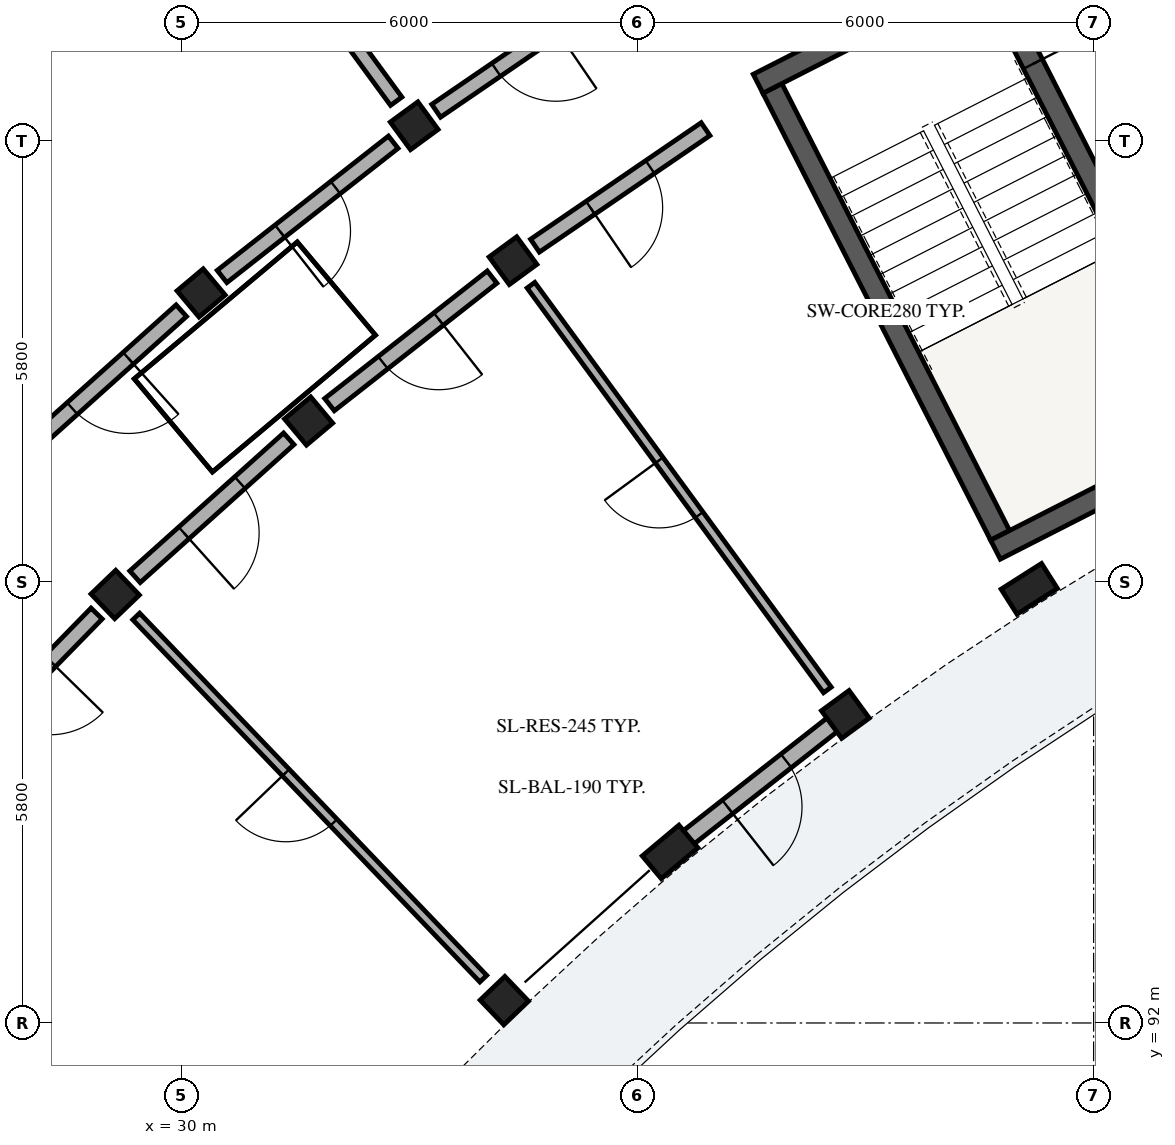
"""IFC4 building model, lengths in metres.
Left out: names, types, materials, properties, quantities, classifications, styles, units other than length and angle.
Written with IfcOpenShell. Run it as: python <this file> out.ifc"""

import sys

from ifc_helpers import new_model, si_unit, direction, frame, frame_2d, origin, origin_2d, place, context, subcontext, project, spatial, rectangle, extrude, element, fill, save


model = new_model("IFC4")
c1 = context("Model", 3, precision=1e-05, world=origin(), true_north=direction((0.0, 1.0)))
c2 = subcontext(c1, "Body", "Model", "MODEL_VIEW")
j1 = project(units=[si_unit("LENGTHUNIT", "METRE"), si_unit("PLANEANGLEUNIT", "RADIAN")], contexts=[c1])
p1 = place(None, origin())
s1 = spatial("IfcSite", under=j1, at=p1, CompositionType="ELEMENT")
p2 = place(p1, origin())
s2 = spatial("IfcBuilding", under=s1, at=p2, CompositionType="ELEMENT")
p3 = place(p2, frame((0.0, 0.0, 39.08)))
s3 = spatial("IfcBuildingStorey", under=s2, at=p3, CompositionType="ELEMENT", Elevation=39.08)
p4 = place(p3, frame((37.773, 104.296, 0.0), z_axis=(0.0, 0.0, 1.0), x_axis=(0.453992276384, -0.891005618941, 0.0)))
e1 = element("IfcWall", 1, at=p4, inside=s3, PredefinedType="SHEAR", context=c2, shape_type="SweptSolid", body=[
    extrude(rectangle(XDim=6.6, YDim=0.28, at=frame_2d((3.3, 0.0))), origin(), (0.0, 0.0, 1.0), 3.11),
])
for number, where, z_axis, x_axis in (
    (2, (40.709, 98.227, 0.0), (0.0, 0.0, 1.0), (0.891, 0.454, 0.0)),
    (3, (37.585, 104.357, 0.0), (0.0, 0.0, 1.0), (0.891, 0.454, 0.0)),
):
    element("IfcWall", number, at=place(p3, frame(where, z_axis=z_axis, x_axis=x_axis)), inside=s3, PredefinedType="SHEAR", context=c2, shape_type="SweptSolid", body=[
        extrude(rectangle(XDim=3.48, YDim=0.28, at=frame_2d((1.74, 0.0))), origin(), (0.0, 0.0, 1.0), 3.11),
    ])
p5 = place(p3, frame((40.625, 105.748, 0.0), z_axis=(0.0, 0.0, 1.0), x_axis=(0.453992276384, -0.891005618941, 0.0)))
e4 = element("IfcWall", 4, at=p5, inside=s3, PredefinedType="SHEAR", context=c2, shape_type="SweptSolid", body=[
    extrude(rectangle(XDim=6.6, YDim=0.28, at=frame_2d((3.3, 0.0))), origin(), (0.0, 0.0, 1.0), 3.11),
])
p6 = place(p5, frame((0.22, 0.0, 0.0)))
e5 = element("IfcOpeningElement", 5, at=p6, cuts=e4, PredefinedType="OPENING", context=c2, shape_type="SweptSolid", body=[
    extrude(rectangle(XDim=1.05, YDim=2.15, at=frame_2d((0.525, 1.075))), frame((0.0, 0.15, 0.0), z_axis=(0.0, -1.0, 0.0), x_axis=(1.0, 0.0, 0.0)), (0.0, 0.0, 1.0), 0.3),
])
p7 = place(p3, frame((41.153, 97.712, 0.0), z_axis=(0.0, 0.0, 1.0), x_axis=(-0.536481603385, 0.843912015099, 0.0)))
e6 = element("IfcColumn", 6, at=p7, inside=s3, PredefinedType="PILASTER", context=c2, shape_type="SweptSolid", body=[
    extrude(rectangle(XDim=0.39, YDim=0.63, at=origin_2d()), origin(), (0.0, 0.0, 1.0), 3.12),
])
for number, where, z_axis, x_axis in (
    (7, (38.734, 96.059, 0.0), (0.0, 0.0, 1.0), (-0.591, 0.807, 0.0)),
    (8, (34.361, 102.029, 0.0), (0.0, 0.0, 1.0), (-0.591, 0.807, 0.0)),
    (9, (33.061, 103.804, 0.0), (0.0, 0.0, 1.0), (-0.591, 0.807, 0.0)),
):
    element("IfcColumn", number, at=place(p3, frame(where, z_axis=z_axis, x_axis=x_axis)), inside=s3, PredefinedType="COLUMN", context=c2, shape_type="SweptSolid", body=[
        extrude(rectangle(XDim=0.45, YDim=0.45, at=origin_2d()), origin(), (0.0, 0.0, 1.0), 3.12),
    ])
p8 = place(p3, frame((36.428, 94.251, 0.0), z_axis=(0.0, 0.0, 1.0), x_axis=(-0.642787636427, 0.766044420681, 0.0)))
e10 = element("IfcColumn", 10, at=p8, inside=s3, PredefinedType="PILASTER", context=c2, shape_type="SweptSolid", body=[
    extrude(rectangle(XDim=0.39, YDim=0.63, at=origin_2d()), origin(), (0.0, 0.0, 1.0), 3.12),
])
for number, where, z_axis, x_axis in (
    (11, (31.671, 99.919, 0.0), (0.0, 0.0, 1.0), (-0.643, 0.766, 0.0)),
    (12, (30.257, 101.605, 0.0), (0.0, 0.0, 1.0), (-0.643, 0.766, 0.0)),
    (13, (34.247, 92.294, 0.0), (0.0, 0.0, 1.0), (-0.692, 0.722, 0.0)),
    (14, (29.127, 97.637, 0.0), (0.0, 0.0, 1.0), (-0.692, 0.722, 0.0)),
):
    element("IfcColumn", number, at=place(p3, frame(where, z_axis=z_axis, x_axis=x_axis)), inside=s3, PredefinedType="COLUMN", context=c2, shape_type="SweptSolid", body=[
        extrude(rectangle(XDim=0.45, YDim=0.45, at=origin_2d()), origin(), (0.0, 0.0, 1.0), 3.12),
    ])
p9 = place(p3, frame((38.58, 95.939, 0.0), z_axis=(0.0, 0.0, 1.0), x_axis=(-0.786819050397, -0.617183750541, 0.0)))
e15 = element("IfcWall", 15, at=p9, inside=s3, PredefinedType="SOLIDWALL", context=c2, shape_type="SweptSolid", body=[
    extrude(rectangle(XDim=2.57, YDim=0.225, at=frame_2d((1.285, 0.0))), origin(), (0.0, 0.0, 1.0), 2.355),
])
p10 = place(p9, frame((0.795, 0.0, 0.0)))
e16 = element("IfcOpeningElement", 16, at=p10, cuts=e15, PredefinedType="OPENING", context=c2, shape_type="SweptSolid", body=[
    extrude(rectangle(XDim=0.98, YDim=2.12, at=frame_2d((0.49, 1.06))), frame((0.0, 0.123, 0.0), z_axis=(0.0, -1.0, 0.0), x_axis=(1.0, 0.0, 0.0)), (0.0, 0.0, 1.0), 0.245),
])
p11 = place(p3, frame((35.714, 105.616, 0.0), z_axis=(0.0, 0.0, 1.0), x_axis=(-0.825779671787, -0.563992848947, 0.0)))
e17 = element("IfcWall", 17, at=p11, inside=s3, PredefinedType="PARTITIONING", context=c2, shape_type="SweptSolid", body=[
    extrude(rectangle(XDim=2.863, YDim=0.205, at=frame_2d((1.432, 0.0))), origin(), (0.0, 0.0, 1.0), 2.37),
])
p12 = place(p11, frame((0.957, 0.0, 0.0)))
e18 = element("IfcOpeningElement", 18, at=p12, cuts=e17, PredefinedType="OPENING", context=c2, shape_type="SweptSolid", body=[
    extrude(rectangle(XDim=0.95, YDim=2.13, at=frame_2d((0.475, 1.065))), frame((0.0, 0.113, 0.0), z_axis=(0.0, -1.0, 0.0), x_axis=(1.0, 0.0, 0.0)), (0.0, 0.0, 1.0), 0.225),
])
p13 = place(p3, frame((36.895, 103.76, 0.0), z_axis=(0.0, 0.0, 1.0), x_axis=(-0.825752009056, -0.56403334967, 0.0)))
e19 = element("IfcWall", 19, at=p13, inside=s3, PredefinedType="PARTITIONING", context=c2, shape_type="SweptSolid", body=[
    extrude(rectangle(XDim=2.718, YDim=0.205, at=frame_2d((1.359, 0.0))), origin(), (0.0, 0.0, 1.0), 2.37),
])
p14 = place(p13, frame((0.884, 0.0, 0.0)))
e20 = element("IfcOpeningElement", 20, at=p14, cuts=e19, PredefinedType="OPENING", context=c2, shape_type="SweptSolid", body=[
    extrude(rectangle(XDim=0.95, YDim=2.13, at=frame_2d((0.475, 1.065))), frame((0.0, 0.113, 0.0), z_axis=(0.0, -1.0, 0.0), x_axis=(1.0, 0.0, 0.0)), (0.0, 0.0, 1.0), 0.225),
])
p15 = place(p3, frame((32.824, 104.126, 0.0), z_axis=(0.0, 0.0, 1.0), x_axis=(-0.590910940129, 0.806736797745, 0.0)))
e21 = element("IfcWall", 21, at=p15, inside=s3, PredefinedType="PARTITIONING", context=c2, shape_type="SweptSolid", body=[
    extrude(rectangle(XDim=4.7, YDim=0.185, at=frame_2d((2.35, 0.0))), origin(), (0.0, 0.0, 1.0), 2.37),
])
p16 = place(p3, frame((38.497, 96.382, 0.0), z_axis=(0.0, 0.0, 1.0), x_axis=(-0.590924179316, 0.806727100263, 0.0)))
e22 = element("IfcWall", 22, at=p16, inside=s3, PredefinedType="PARTITIONING", context=c2, shape_type="SweptSolid", body=[
    extrude(rectangle(XDim=6.6, YDim=0.125, at=frame_2d((3.3, 0.0))), origin(), (0.0, 0.0, 1.0), 2.37),
])
p17 = place(p16, frame((2.855, 0.0, 0.0)))
e23 = element("IfcOpeningElement", 23, at=p17, cuts=e22, PredefinedType="OPENING", context=c2, shape_type="SweptSolid", body=[
    extrude(rectangle(XDim=0.89, YDim=2.1, at=frame_2d((0.445, 1.05))), frame((0.0, 0.073, 0.0), z_axis=(0.0, -1.0, 0.0), x_axis=(1.0, 0.0, 0.0)), (0.0, 0.0, 1.0), 0.145),
])
p18 = place(p3, frame((32.785, 103.588, 0.0), z_axis=(0.0, 0.0, 1.0), x_axis=(-0.786806323554, -0.617199975061, 0.0)))
e24 = element("IfcWall", 24, at=p18, inside=s3, PredefinedType="PARTITIONING", context=c2, shape_type="SweptSolid", body=[
    extrude(rectangle(XDim=2.863, YDim=0.205, at=frame_2d((1.432, 0.0))), origin(), (0.0, 0.0, 1.0), 2.37),
])
p19 = place(p18, frame((0.967, 0.0, 0.0)))
e25 = element("IfcOpeningElement", 25, at=p19, cuts=e24, PredefinedType="OPENING", context=c2, shape_type="SweptSolid", body=[
    extrude(rectangle(XDim=0.93, YDim=2.12, at=frame_2d((0.465, 1.06))), frame((0.0, 0.113, 0.0), z_axis=(0.0, -1.0, 0.0), x_axis=(1.0, 0.0, 0.0)), (0.0, 0.0, 1.0), 0.225),
])
p20 = place(p3, frame((34.085, 101.813, 0.0), z_axis=(0.0, 0.0, 1.0), x_axis=(-0.786835457019, -0.617162833924, 0.0)))
e26 = element("IfcWall", 26, at=p20, inside=s3, PredefinedType="PARTITIONING", context=c2, shape_type="SweptSolid", body=[
    extrude(rectangle(XDim=2.718, YDim=0.205, at=frame_2d((1.359, 0.0))), origin(), (0.0, 0.0, 1.0), 2.37),
])
p21 = place(p20, frame((0.894, 0.0, 0.0)))
e27 = element("IfcOpeningElement", 27, at=p21, cuts=e26, PredefinedType="OPENING", context=c2, shape_type="SweptSolid", body=[
    extrude(rectangle(XDim=0.93, YDim=2.12, at=frame_2d((0.465, 1.06))), frame((0.0, 0.113, 0.0), z_axis=(0.0, -1.0, 0.0), x_axis=(1.0, 0.0, 0.0)), (0.0, 0.0, 1.0), 0.225),
])
p22 = place(p3, frame((29.997, 101.371, 0.0), z_axis=(0.0, 0.0, 1.0), x_axis=(-0.744433521088, -0.667696587291, 0.0)))
e28 = element("IfcWall", 28, at=p22, inside=s3, PredefinedType="PARTITIONING", context=c2, shape_type="SweptSolid", body=[
    extrude(rectangle(XDim=2.863, YDim=0.205, at=frame_2d((1.432, 0.0))), origin(), (0.0, 0.0, 1.0), 2.37),
])
p23 = place(p22, frame((0.937, 0.0, 0.0)))
e29 = element("IfcOpeningElement", 29, at=p23, cuts=e28, PredefinedType="OPENING", context=c2, shape_type="SweptSolid", body=[
    extrude(rectangle(XDim=0.99, YDim=2.16, at=frame_2d((0.495, 1.08))), frame((0.0, 0.113, 0.0), z_axis=(0.0, -1.0, 0.0), x_axis=(1.0, 0.0, 0.0)), (0.0, 0.0, 1.0), 0.225),
])
p24 = place(p3, frame((31.411, 99.686, 0.0), z_axis=(0.0, 0.0, 1.0), x_axis=(-0.744418559135, -0.667713268413, 0.0)))
e30 = element("IfcWall", 30, at=p24, inside=s3, PredefinedType="PARTITIONING", context=c2, shape_type="SweptSolid", body=[
    extrude(rectangle(XDim=2.718, YDim=0.205, at=frame_2d((1.359, 0.0))), origin(), (0.0, 0.0, 1.0), 2.37),
])
p25 = place(p24, frame((0.864, 0.0, 0.0)))
e31 = element("IfcOpeningElement", 31, at=p25, cuts=e30, PredefinedType="OPENING", context=c2, shape_type="SweptSolid", body=[
    extrude(rectangle(XDim=0.99, YDim=2.16, at=frame_2d((0.495, 1.08))), frame((0.0, 0.113, 0.0), z_axis=(0.0, -1.0, 0.0), x_axis=(1.0, 0.0, 0.0)), (0.0, 0.0, 1.0), 0.225),
])
p26 = place(p3, frame((33.97, 92.583, 0.0), z_axis=(0.0, 0.0, 1.0), x_axis=(-0.691872422458, 0.722019771919, 0.0)))
e32 = element("IfcWall", 32, at=p26, inside=s3, PredefinedType="PARTITIONING", context=c2, shape_type="SweptSolid", body=[
    extrude(rectangle(XDim=6.6, YDim=0.125, at=frame_2d((3.3, 0.0))), origin(), (0.0, 0.0, 1.0), 2.37),
])
p27 = place(p26, frame((2.845, 0.0, 0.0)))
e33 = element("IfcOpeningElement", 33, at=p27, cuts=e32, PredefinedType="OPENING", context=c2, shape_type="SweptSolid", body=[
    extrude(rectangle(XDim=0.91, YDim=2.1, at=frame_2d((0.455, 1.05))), frame((0.0, 0.073, 0.0), z_axis=(0.0, -1.0, 0.0), x_axis=(1.0, 0.0, 0.0)), (0.0, 0.0, 1.0), 0.145),
])
p28 = place(p3, frame((28.882, 97.387, 0.0), z_axis=(0.0, 0.0, 1.0), x_axis=(-0.698840007829, -0.715278018296, 0.0)))
e34 = element("IfcWall", 34, at=p28, inside=s3, PredefinedType="PARTITIONING", context=c2, shape_type="SweptSolid", body=[
    extrude(rectangle(XDim=2.718, YDim=0.205, at=frame_2d((1.359, 0.0))), origin(), (0.0, 0.0, 1.0), 2.37),
])
p29 = place(p28, frame((0.874, 0.0, 0.0)))
e35 = element("IfcOpeningElement", 35, at=p29, cuts=e34, PredefinedType="OPENING", context=c2, shape_type="SweptSolid", body=[
    extrude(rectangle(XDim=0.97, YDim=2.15, at=frame_2d((0.485, 1.075))), frame((0.0, 0.113, 0.0), z_axis=(0.0, -1.0, 0.0), x_axis=(1.0, 0.0, 0.0)), (0.0, 0.0, 1.0), 0.225),
])
p30 = place(p10, origin())
e36 = element("IfcDoor", 36, at=p30, inside=s3, OperationType="SINGLE_SWING_RIGHT", PredefinedType="DOOR", context=c2, shape_type="SweptSolid", body=[
    extrude(rectangle(XDim=0.98, YDim=2.12, at=frame_2d((0.49, 1.06))), frame((0.0, 0.025, 0.0), z_axis=(0.0, -1.0, 0.0), x_axis=(1.0, 0.0, 0.0)), (0.0, 0.0, 1.0), 0.05),
])
fill(e16, e36)
p31 = place(p6, origin())
e37 = element("IfcDoor", 37, at=p31, inside=s3, OperationType="SINGLE_SWING_RIGHT", PredefinedType="DOOR", context=c2, shape_type="SweptSolid", body=[
    extrude(rectangle(XDim=1.05, YDim=2.15, at=frame_2d((0.525, 1.075))), frame((0.0, 0.025, 0.0), z_axis=(0.0, -1.0, 0.0), x_axis=(1.0, 0.0, 0.0)), (0.0, 0.0, 1.0), 0.05),
])
fill(e5, e37)
p32 = place(p12, origin())
e38 = element("IfcDoor", 38, at=p32, inside=s3, OperationType="SINGLE_SWING_LEFT", PredefinedType="DOOR", context=c2, shape_type="SweptSolid", body=[
    extrude(rectangle(XDim=0.95, YDim=2.13, at=frame_2d((0.475, 1.065))), frame((0.0, 0.025, 0.0), z_axis=(0.0, -1.0, 0.0), x_axis=(1.0, 0.0, 0.0)), (0.0, 0.0, 1.0), 0.05),
])
fill(e18, e38)
p33 = place(p14, origin())
e39 = element("IfcDoor", 39, at=p33, inside=s3, OperationType="SINGLE_SWING_RIGHT", PredefinedType="DOOR", context=c2, shape_type="SweptSolid", body=[
    extrude(rectangle(XDim=0.95, YDim=2.13, at=frame_2d((0.475, 1.065))), frame((0.0, 0.025, 0.0), z_axis=(0.0, -1.0, 0.0), x_axis=(1.0, 0.0, 0.0)), (0.0, 0.0, 1.0), 0.05),
])
fill(e20, e39)
p34 = place(p17, origin())
e40 = element("IfcDoor", 40, at=p34, inside=s3, OperationType="SINGLE_SWING_RIGHT", PredefinedType="DOOR", context=c2, shape_type="SweptSolid", body=[
    extrude(rectangle(XDim=0.89, YDim=2.1, at=frame_2d((0.445, 1.05))), frame((0.0, 0.025, 0.0), z_axis=(0.0, -1.0, 0.0), x_axis=(1.0, 0.0, 0.0)), (0.0, 0.0, 1.0), 0.05),
])
fill(e23, e40)
p35 = place(p19, origin())
e41 = element("IfcDoor", 41, at=p35, inside=s3, OperationType="SINGLE_SWING_RIGHT", PredefinedType="DOOR", context=c2, shape_type="SweptSolid", body=[
    extrude(rectangle(XDim=0.93, YDim=2.12, at=frame_2d((0.465, 1.06))), frame((0.0, 0.025, 0.0), z_axis=(0.0, -1.0, 0.0), x_axis=(1.0, 0.0, 0.0)), (0.0, 0.0, 1.0), 0.05),
])
fill(e25, e41)
p36 = place(p21, origin())
e42 = element("IfcDoor", 42, at=p36, inside=s3, OperationType="SINGLE_SWING_LEFT", PredefinedType="DOOR", context=c2, shape_type="SweptSolid", body=[
    extrude(rectangle(XDim=0.93, YDim=2.12, at=frame_2d((0.465, 1.06))), frame((0.0, 0.025, 0.0), z_axis=(0.0, -1.0, 0.0), x_axis=(1.0, 0.0, 0.0)), (0.0, 0.0, 1.0), 0.05),
])
fill(e27, e42)
p37 = place(p23, origin())
e43 = element("IfcDoor", 43, at=p37, inside=s3, OperationType="SINGLE_SWING_LEFT", PredefinedType="DOOR", context=c2, shape_type="SweptSolid", body=[
    extrude(rectangle(XDim=0.99, YDim=2.16, at=frame_2d((0.495, 1.08))), frame((0.0, 0.025, 0.0), z_axis=(0.0, -1.0, 0.0), x_axis=(1.0, 0.0, 0.0)), (0.0, 0.0, 1.0), 0.05),
])
fill(e29, e43)
p38 = place(p25, origin())
e44 = element("IfcDoor", 44, at=p38, inside=s3, OperationType="SINGLE_SWING_RIGHT", PredefinedType="DOOR", context=c2, shape_type="SweptSolid", body=[
    extrude(rectangle(XDim=0.99, YDim=2.16, at=frame_2d((0.495, 1.08))), frame((0.0, 0.025, 0.0), z_axis=(0.0, -1.0, 0.0), x_axis=(1.0, 0.0, 0.0)), (0.0, 0.0, 1.0), 0.05),
])
fill(e31, e44)
p39 = place(p27, origin())
e45 = element("IfcDoor", 45, at=p39, inside=s3, OperationType="SINGLE_SWING_RIGHT", PredefinedType="DOOR", context=c2, shape_type="SweptSolid", body=[
    extrude(rectangle(XDim=0.91, YDim=2.1, at=frame_2d((0.455, 1.05))), frame((0.0, 0.025, 0.0), z_axis=(0.0, -1.0, 0.0), x_axis=(1.0, 0.0, 0.0)), (0.0, 0.0, 1.0), 0.05),
])
fill(e33, e45)
save(model, sys.argv[1])
